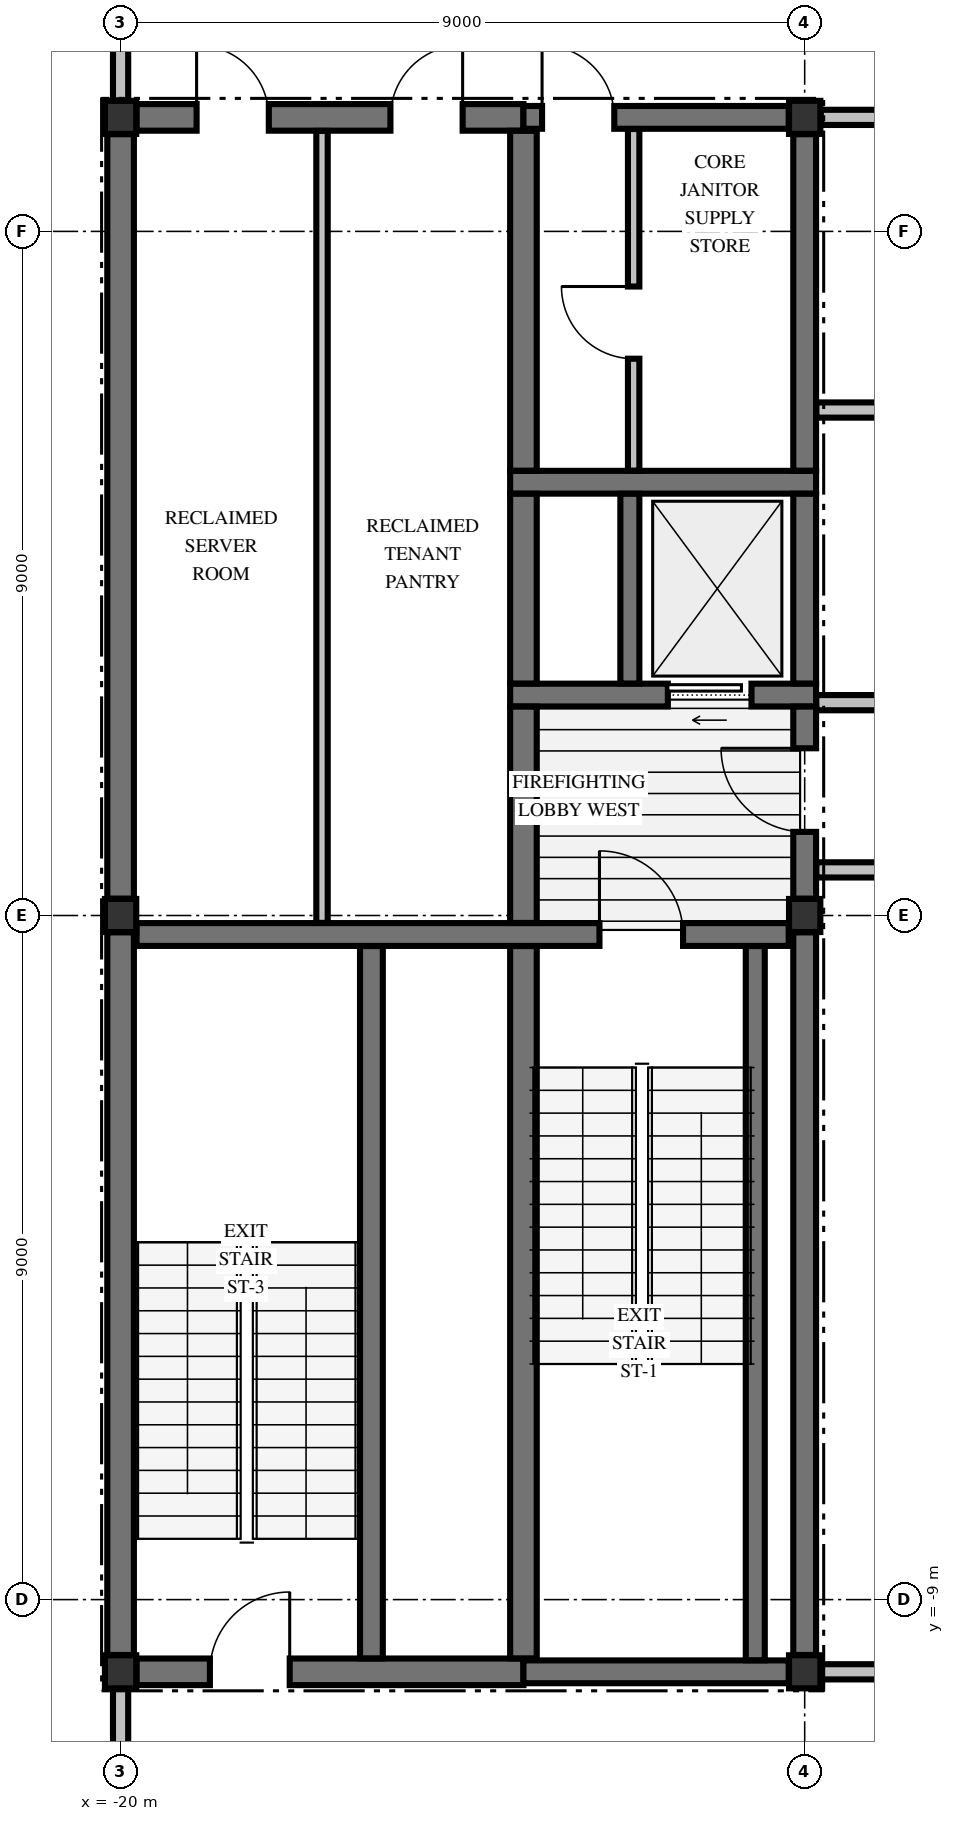
"""IFC4 building model, lengths in metres.
Left out: names, types, materials, properties, quantities, classifications, styles, units other than length and angle.
Written with IfcOpenShell. Run it as: python <this file> out.ifc"""

import sys

from ifc_helpers import new_model, si_unit, direction, frame, frame_2d, origin, origin_2d, place, context, subcontext, project, spatial, rectangle, i_section, extrude, element, fill, save


model = new_model("IFC4")
c1 = context("Model", 3, precision=1e-05, world=origin(), true_north=direction((0.0, 1.0)))
c2 = subcontext(c1, "Body", "Model", "MODEL_VIEW")
j1 = project(units=[si_unit("LENGTHUNIT", "METRE"), si_unit("PLANEANGLEUNIT", "RADIAN")], contexts=[c1])
p1 = place(None, origin())
s1 = spatial("IfcSite", under=j1, at=p1, CompositionType="ELEMENT")
p2 = place(p1, origin())
s2 = spatial("IfcBuilding", under=s1, at=p2, CompositionType="ELEMENT")
p3 = place(p2, frame((0.0, 0.0, 153.48)))
s3 = spatial("IfcBuildingStorey", under=s2, at=p3, CompositionType="ELEMENT", Elevation=153.48)
for number, where, z_axis, x_axis in (
    (1, (-20.0, -9.95, -0.425), (0.0, 0.0, 1.0), (1.0, 0.0, 0.0)),
    (2, (-20.0, 10.5, -0.425), (0.0, 0.0, 1.0), (1.0, 0.0, 0.0)),
    (3, (-11.0, -9.95, -0.425), (0.0, 0.0, 1.0), (1.0, 0.0, 0.0)),
    (4, (-11.0, 0.0, -0.425), (0.0, 0.0, 1.0), (1.0, 0.0, 0.0)),
    (5, (-11.0, 10.5, -0.425), (0.0, 0.0, 1.0), (1.0, 0.0, 0.0)),
    (6, (-20.0, 0.0, -0.425), (0.0, 0.0, 1.0), (1.0, 0.0, 0.0)),
):
    element("IfcColumn", number, at=place(p3, frame(where, z_axis=z_axis, x_axis=x_axis)), inside=s3, PredefinedType="COLUMN", context=c2, shape_type="SweptSolid", body=[
        extrude(i_section(OverallWidth=0.412, OverallDepth=0.435, WebThickness=0.036, FlangeThickness=0.058, FilletRadius=0.015, at=origin_2d()), origin(), (0.0, 0.0, 1.0), 4.76),
    ])
p4 = place(p3, frame((-19.79, -9.95, 0.0), z_axis=(0.0, 0.0, 1.0), x_axis=(1.0, 0.0, 0.0)))
e7 = element("IfcWall", 7, at=p4, inside=s3, PredefinedType="SHEAR", context=c2, shape_type="SweptSolid", body=[
    extrude(rectangle(XDim=5.09, YDim=0.35, at=frame_2d((2.545, 0.0))), origin(), (0.0, 0.0, 1.0), 4.335),
])
p5 = place(p4, frame((0.965, 0.0, 0.0)))
e8 = element("IfcOpeningElement", 8, at=p5, cuts=e7, PredefinedType="OPENING", context=c2, shape_type="SweptSolid", body=[
    extrude(rectangle(XDim=1.05, YDim=2.15, at=frame_2d((0.525, 1.075))), frame((0.0, 0.185, 0.0), z_axis=(0.0, -1.0, 0.0), x_axis=(1.0, 0.0, 0.0)), (0.0, 0.0, 1.0), 0.37),
])
p6 = place(p3, frame((-14.7, -9.95, 0.0), z_axis=(0.0, 0.0, 1.0), x_axis=(1.0, 0.0, 0.0)))
e9 = element("IfcWall", 9, at=p6, inside=s3, PredefinedType="SHEAR", context=c2, shape_type="SweptSolid", body=[
    extrude(rectangle(XDim=3.49, YDim=0.3, at=frame_2d((1.745, 0.0))), origin(), (0.0, 0.0, 1.0), 4.335),
])
p7 = place(p3, frame((-19.79, -0.25, 0.0), z_axis=(0.0, 0.0, 1.0), x_axis=(1.0, 0.0, 0.0)))
e10 = element("IfcWall", 10, at=p7, inside=s3, PredefinedType="SHEAR", context=c2, shape_type="SweptSolid", body=[
    extrude(rectangle(XDim=8.58, YDim=0.3, at=frame_2d((4.29, 0.0))), origin(), (0.0, 0.0, 1.0), 4.335),
])
p8 = place(p7, frame((6.09, 0.0, 0.0)))
e11 = element("IfcOpeningElement", 11, at=p8, cuts=e10, PredefinedType="OPENING", context=c2, shape_type="SweptSolid", body=[
    extrude(rectangle(XDim=1.1, YDim=2.15, at=frame_2d((0.55, 1.075))), frame((0.0, 0.16, 0.0), z_axis=(0.0, -1.0, 0.0), x_axis=(1.0, 0.0, 0.0)), (0.0, 0.0, 1.0), 0.32),
])
p9 = place(p3, frame((-14.875, 2.9, 0.0), z_axis=(0.0, 0.0, 1.0), x_axis=(1.0, 0.0, 0.0)))
e12 = element("IfcWall", 12, at=p9, inside=s3, PredefinedType="SHEAR", context=c2, shape_type="SweptSolid", body=[
    extrude(rectangle(XDim=4.025, YDim=0.3, at=frame_2d((2.012, 0.0))), origin(), (0.0, 0.0, 1.0), 4.335),
])
p10 = place(p9, frame((2.075, 0.0, 0.0)))
e13 = element("IfcOpeningElement", 13, at=p10, cuts=e12, PredefinedType="OPENING", context=c2, shape_type="SweptSolid", body=[
    extrude(rectangle(XDim=1.1, YDim=2.2, at=frame_2d((0.55, 1.1))), frame((0.0, 0.16, 0.0), z_axis=(0.0, -1.0, 0.0), x_axis=(1.0, 0.0, 0.0)), (0.0, 0.0, 1.0), 0.32),
])
p11 = place(p3, frame((-14.875, 5.7, 0.0), z_axis=(0.0, 0.0, 1.0), x_axis=(1.0, 0.0, 0.0)))
e14 = element("IfcWall", 14, at=p11, inside=s3, PredefinedType="SHEAR", context=c2, shape_type="SweptSolid", body=[
    extrude(rectangle(XDim=4.025, YDim=0.3, at=frame_2d((2.012, 0.0))), origin(), (0.0, 0.0, 1.0), 4.335),
])
p12 = place(p3, frame((-19.79, 10.5, 0.0), z_axis=(0.0, 0.0, 1.0), x_axis=(1.0, 0.0, 0.0)))
e15 = element("IfcWall", 15, at=p12, inside=s3, PredefinedType="SHEAR", context=c2, shape_type="SweptSolid", body=[
    extrude(rectangle(XDim=5.09, YDim=0.35, at=frame_2d((2.545, 0.0))), origin(), (0.0, 0.0, 1.0), 4.335),
])
p13 = place(p12, frame((0.79, 0.0, 0.0)))
e16 = element("IfcOpeningElement", 16, at=p13, cuts=e15, PredefinedType="OPENING", context=c2, shape_type="SweptSolid", body=[
    extrude(rectangle(XDim=0.95, YDim=2.02, at=frame_2d((0.475, 1.01))), frame((0.0, 0.185, 0.0), z_axis=(0.0, -1.0, 0.0), x_axis=(1.0, 0.0, 0.0)), (0.0, 0.0, 1.0), 0.37),
])
p14 = place(p12, frame((3.34, 0.0, 0.0)))
e17 = element("IfcOpeningElement", 17, at=p14, cuts=e15, PredefinedType="OPENING", context=c2, shape_type="SweptSolid", body=[
    extrude(rectangle(XDim=0.95, YDim=2.02, at=frame_2d((0.475, 1.01))), frame((0.0, 0.185, 0.0), z_axis=(0.0, -1.0, 0.0), x_axis=(1.0, 0.0, 0.0)), (0.0, 0.0, 1.0), 0.37),
])
p15 = place(p3, frame((-14.7, 10.5, 0.0), z_axis=(0.0, 0.0, 1.0), x_axis=(1.0, 0.0, 0.0)))
e18 = element("IfcWall", 18, at=p15, inside=s3, PredefinedType="SHEAR", context=c2, shape_type="SweptSolid", body=[
    extrude(rectangle(XDim=3.49, YDim=0.3, at=frame_2d((1.745, 0.0))), origin(), (0.0, 0.0, 1.0), 4.335),
])
p16 = place(p15, frame((0.245, 0.0, 0.0)))
e19 = element("IfcOpeningElement", 19, at=p16, cuts=e18, PredefinedType="OPENING", context=c2, shape_type="SweptSolid", body=[
    extrude(rectangle(XDim=0.95, YDim=2.02, at=frame_2d((0.475, 1.01))), frame((0.0, 0.16, 0.0), z_axis=(0.0, -1.0, 0.0), x_axis=(1.0, 0.0, 0.0)), (0.0, 0.0, 1.0), 0.32),
])
p17 = place(p3, frame((-10.788, -9.95, 0.0), z_axis=(0.0, 0.0, 1.0), x_axis=(1.0, 0.0, 0.0)))
e20 = element("IfcWall", 20, at=p17, inside=s3, PredefinedType="PARTITIONING", context=c2, shape_type="SweptSolid", body=[
    extrude(rectangle(XDim=21.576, YDim=0.2, at=frame_2d((10.788, 0.0))), origin(), (0.0, 0.0, 1.0), 4.335),
])
p18 = place(p17, frame((7.238, 0.0, 0.0)))
e21 = element("IfcOpeningElement", 21, at=p18, cuts=e20, PredefinedType="OPENING", context=c2, shape_type="SweptSolid", body=[
    extrude(rectangle(XDim=1.1, YDim=2.15, at=frame_2d((0.55, 1.075))), frame((0.0, 0.11, 0.0), z_axis=(0.0, -1.0, 0.0), x_axis=(1.0, 0.0, 0.0)), (0.0, 0.0, 1.0), 0.22),
])
p19 = place(p3, frame((-10.847, 0.6, 0.0), z_axis=(0.0, 0.0, 1.0), x_axis=(1.0, 0.0, 0.0)))
e22 = element("IfcWall", 22, at=p19, inside=s3, PredefinedType="PARTITIONING", context=c2, shape_type="SweptSolid", body=[
    extrude(rectangle(XDim=21.694, YDim=0.2, at=frame_2d((10.847, 0.0))), origin(), (0.0, 0.0, 1.0), 4.335),
])
p20 = place(p19, frame((7.297, 0.0, 0.0)))
e23 = element("IfcOpeningElement", 23, at=p20, cuts=e22, PredefinedType="OPENING", context=c2, shape_type="SweptSolid", body=[
    extrude(rectangle(XDim=1.1, YDim=2.15, at=frame_2d((0.55, 1.075))), frame((0.0, 0.11, 0.0), z_axis=(0.0, -1.0, 0.0), x_axis=(1.0, 0.0, 0.0)), (0.0, 0.0, 1.0), 0.22),
])
p21 = place(p19, frame((2.647, 0.0, 0.0)))
e24 = element("IfcOpeningElement", 24, at=p21, cuts=e22, PredefinedType="OPENING", context=c2, shape_type="SweptSolid", body=[
    extrude(rectangle(XDim=1.2, YDim=2.15, at=frame_2d((0.6, 1.075))), frame((0.0, 0.11, 0.0), z_axis=(0.0, -1.0, 0.0), x_axis=(1.0, 0.0, 0.0)), (0.0, 0.0, 1.0), 0.22),
])
p22 = place(p19, frame((14.847, 0.0, 0.0)))
e25 = element("IfcOpeningElement", 25, at=p22, cuts=e22, PredefinedType="OPENING", context=c2, shape_type="SweptSolid", body=[
    extrude(rectangle(XDim=1.2, YDim=2.15, at=frame_2d((0.6, 1.075))), frame((0.0, 0.11, 0.0), z_axis=(0.0, -1.0, 0.0), x_axis=(1.0, 0.0, 0.0)), (0.0, 0.0, 1.0), 0.22),
])
p23 = place(p3, frame((-10.847, 2.8, 0.0), z_axis=(0.0, 0.0, 1.0), x_axis=(1.0, 0.0, 0.0)))
e26 = element("IfcWall", 26, at=p23, inside=s3, PredefinedType="PARTITIONING", context=c2, shape_type="SweptSolid", body=[
    extrude(rectangle(XDim=21.694, YDim=0.2, at=frame_2d((10.847, 0.0))), origin(), (0.0, 0.0, 1.0), 4.335),
])
p24 = place(p23, frame((7.297, 0.0, 0.0)))
e27 = element("IfcOpeningElement", 27, at=p24, cuts=e26, PredefinedType="OPENING", context=c2, shape_type="SweptSolid", body=[
    extrude(rectangle(XDim=1.1, YDim=2.15, at=frame_2d((0.55, 1.075))), frame((0.0, 0.11, 0.0), z_axis=(0.0, -1.0, 0.0), x_axis=(1.0, 0.0, 0.0)), (0.0, 0.0, 1.0), 0.22),
])
p25 = place(p23, frame((17.497, 0.0, 0.0)))
e28 = element("IfcOpeningElement", 28, at=p25, cuts=e26, PredefinedType="OPENING", context=c2, shape_type="SweptSolid", body=[
    extrude(rectangle(XDim=1.1, YDim=2.15, at=frame_2d((0.55, 1.075))), frame((0.0, 0.11, 0.0), z_axis=(0.0, -1.0, 0.0), x_axis=(1.0, 0.0, 0.0)), (0.0, 0.0, 1.0), 0.22),
])
p26 = place(p3, frame((-10.847, 6.65, 0.0), z_axis=(0.0, 0.0, 1.0), x_axis=(1.0, 0.0, 0.0)))
e29 = element("IfcWall", 29, at=p26, inside=s3, PredefinedType="PARTITIONING", context=c2, shape_type="SweptSolid", body=[
    extrude(rectangle(XDim=6.747, YDim=0.2, at=frame_2d((3.374, 0.0))), origin(), (0.0, 0.0, 1.0), 4.335),
])
p27 = place(p3, frame((-10.788, 10.5, 0.0), z_axis=(0.0, 0.0, 1.0), x_axis=(1.0, 0.0, 0.0)))
e30 = element("IfcWall", 30, at=p27, inside=s3, PredefinedType="PARTITIONING", context=c2, shape_type="SweptSolid", body=[
    extrude(rectangle(XDim=21.576, YDim=0.2, at=frame_2d((10.788, 0.0))), origin(), (0.0, 0.0, 1.0), 4.335),
])
p28 = place(p27, frame((7.238, 0.0, 0.0)))
e31 = element("IfcOpeningElement", 31, at=p28, cuts=e30, PredefinedType="OPENING", context=c2, shape_type="SweptSolid", body=[
    extrude(rectangle(XDim=1.1, YDim=2.15, at=frame_2d((0.55, 1.075))), frame((0.0, 0.11, 0.0), z_axis=(0.0, -1.0, 0.0), x_axis=(1.0, 0.0, 0.0)), (0.0, 0.0, 1.0), 0.22),
])
p29 = place(p3, frame((-20.0, -9.729, 0.0), z_axis=(0.0, 0.0, 1.0), x_axis=(0.0, 1.0, 0.0)))
e32 = element("IfcWall", 32, at=p29, inside=s3, PredefinedType="SHEAR", context=c2, shape_type="SweptSolid", body=[
    extrude(rectangle(XDim=9.507, YDim=0.35, at=frame_2d((4.753, 0.0))), origin(), (0.0, 0.0, 1.0), 4.335),
])
p30 = place(p3, frame((-20.0, 0.221, 0.0), z_axis=(0.0, 0.0, 1.0), x_axis=(0.0, 1.0, 0.0)))
e33 = element("IfcWall", 33, at=p30, inside=s3, PredefinedType="SHEAR", context=c2, shape_type="SweptSolid", body=[
    extrude(rectangle(XDim=10.057, YDim=0.35, at=frame_2d((5.029, 0.0))), origin(), (0.0, 0.0, 1.0), 4.335),
])
p31 = place(p3, frame((-16.7, -9.773, 0.0), z_axis=(0.0, 0.0, 1.0), x_axis=(0.0, 1.0, 0.0)))
e34 = element("IfcWall", 34, at=p31, inside=s3, PredefinedType="SHEAR", context=c2, shape_type="SweptSolid", body=[
    extrude(rectangle(XDim=9.371, YDim=0.3, at=frame_2d((4.686, 0.0))), origin(), (0.0, 0.0, 1.0), 4.335),
])
p32 = place(p3, frame((-14.7, -9.773, 0.0), z_axis=(0.0, 0.0, 1.0), x_axis=(0.0, 1.0, 0.0)))
e35 = element("IfcWall", 35, at=p32, inside=s3, PredefinedType="SHEAR", context=c2, shape_type="SweptSolid", body=[
    extrude(rectangle(XDim=9.371, YDim=0.35, at=frame_2d((4.686, 0.0))), origin(), (0.0, 0.0, 1.0), 4.335),
])
p33 = place(p3, frame((-14.7, -0.098, 0.0), z_axis=(0.0, 0.0, 1.0), x_axis=(0.0, 1.0, 0.0)))
e36 = element("IfcWall", 36, at=p33, inside=s3, PredefinedType="SHEAR", context=c2, shape_type="SweptSolid", body=[
    extrude(rectangle(XDim=2.846, YDim=0.35, at=frame_2d((1.423, 0.0))), origin(), (0.0, 0.0, 1.0), 4.335),
])
p34 = place(p3, frame((-14.7, 3.052, 0.0), z_axis=(0.0, 0.0, 1.0), x_axis=(0.0, 1.0, 0.0)))
e37 = element("IfcWall", 37, at=p34, inside=s3, PredefinedType="SHEAR", context=c2, shape_type="SweptSolid", body=[
    extrude(rectangle(XDim=2.496, YDim=0.35, at=frame_2d((1.248, 0.0))), origin(), (0.0, 0.0, 1.0), 4.335),
])
p35 = place(p3, frame((-14.7, 5.852, 0.0), z_axis=(0.0, 0.0, 1.0), x_axis=(0.0, 1.0, 0.0)))
e38 = element("IfcWall", 38, at=p35, inside=s3, PredefinedType="SHEAR", context=c2, shape_type="SweptSolid", body=[
    extrude(rectangle(XDim=4.471, YDim=0.35, at=frame_2d((2.235, 0.0))), origin(), (0.0, 0.0, 1.0), 4.335),
])
p36 = place(p3, frame((-13.3, 3.052, 0.0), z_axis=(0.0, 0.0, 1.0), x_axis=(0.0, 1.0, 0.0)))
e39 = element("IfcWall", 39, at=p36, inside=s3, PredefinedType="SOLIDWALL", context=c2, shape_type="SweptSolid", body=[
    extrude(rectangle(XDim=2.496, YDim=0.25, at=frame_2d((1.248, 0.0))), origin(), (0.0, 0.0, 1.0), 4.335),
])
p37 = place(p3, frame((-11.65, -9.798, 0.0), z_axis=(0.0, 0.0, 1.0), x_axis=(0.0, 1.0, 0.0)))
e40 = element("IfcWall", 40, at=p37, inside=s3, PredefinedType="SOLIDWALL", context=c2, shape_type="SweptSolid", body=[
    extrude(rectangle(XDim=9.396, YDim=0.25, at=frame_2d((4.698, 0.0))), origin(), (0.0, 0.0, 1.0), 4.335),
])
p38 = place(p3, frame((-11.0, -9.729, 0.0), z_axis=(0.0, 0.0, 1.0), x_axis=(0.0, 1.0, 0.0)))
e41 = element("IfcWall", 41, at=p38, inside=s3, PredefinedType="SHEAR", context=c2, shape_type="SweptSolid", body=[
    extrude(rectangle(XDim=9.507, YDim=0.3, at=frame_2d((4.753, 0.0))), origin(), (0.0, 0.0, 1.0), 4.335),
])
p39 = place(p3, frame((-11.0, 0.221, 0.0), z_axis=(0.0, 0.0, 1.0), x_axis=(0.0, 1.0, 0.0)))
e42 = element("IfcWall", 42, at=p39, inside=s3, PredefinedType="SHEAR", context=c2, shape_type="SweptSolid", body=[
    extrude(rectangle(XDim=2.527, YDim=0.3, at=frame_2d((1.263, 0.0))), origin(), (0.0, 0.0, 1.0), 4.335),
])
p40 = place(p39, frame((0.878, 0.0, 0.0)))
e43 = element("IfcOpeningElement", 43, at=p40, cuts=e42, PredefinedType="OPENING", context=c2, shape_type="SweptSolid", body=[
    extrude(rectangle(XDim=1.1, YDim=2.15, at=frame_2d((0.55, 1.075))), frame((0.0, 0.16, 0.0), z_axis=(0.0, -1.0, 0.0), x_axis=(1.0, 0.0, 0.0)), (0.0, 0.0, 1.0), 0.32),
])
p41 = place(p3, frame((-11.0, 3.052, 0.0), z_axis=(0.0, 0.0, 1.0), x_axis=(0.0, 1.0, 0.0)))
e44 = element("IfcWall", 44, at=p41, inside=s3, PredefinedType="SHEAR", context=c2, shape_type="SweptSolid", body=[
    extrude(rectangle(XDim=2.496, YDim=0.3, at=frame_2d((1.248, 0.0))), origin(), (0.0, 0.0, 1.0), 4.335),
])
p42 = place(p3, frame((-11.0, 5.852, 0.0), z_axis=(0.0, 0.0, 1.0), x_axis=(0.0, 1.0, 0.0)))
e45 = element("IfcWall", 45, at=p42, inside=s3, PredefinedType="SHEAR", context=c2, shape_type="SweptSolid", body=[
    extrude(rectangle(XDim=4.427, YDim=0.3, at=frame_2d((2.213, 0.0))), origin(), (0.0, 0.0, 1.0), 4.335),
])
p43 = place(p3, frame((-20.0, -12.697, 0.0), z_axis=(0.0, 0.0, 1.0), x_axis=(0.0, 1.0, 0.0)))
e46 = element("IfcWall", 46, at=p43, inside=s3, PredefinedType="PARTITIONING", context=c2, shape_type="SweptSolid", body=[
    extrude(rectangle(XDim=2.523, YDim=0.2, at=frame_2d((1.262, 0.0))), origin(), (0.0, 0.0, 1.0), 1.927),
])
p44 = place(p3, frame((-20.0, 10.723, 0.0), z_axis=(0.0, 0.0, 1.0), x_axis=(0.0, 1.0, 0.0)))
e47 = element("IfcWall", 47, at=p44, inside=s3, PredefinedType="PARTITIONING", context=c2, shape_type="SweptSolid", body=[
    extrude(rectangle(XDim=1.974, YDim=0.2, at=frame_2d((0.987, 0.0))), origin(), (0.0, 0.0, 1.0), 2.127),
])
p45 = place(p3, frame((-17.35, -0.097, 0.0), z_axis=(0.0, 0.0, 1.0), x_axis=(0.0, 1.0, 0.0)))
e48 = element("IfcWall", 48, at=p45, inside=s3, PredefinedType="PARTITIONING", context=c2, shape_type="SweptSolid", body=[
    extrude(rectangle(XDim=10.419, YDim=0.15, at=frame_2d((5.209, 0.0))), origin(), (0.0, 0.0, 1.0), 4.335),
])
p46 = place(p3, frame((-13.25, 5.853, 0.0), z_axis=(0.0, 0.0, 1.0), x_axis=(0.0, 1.0, 0.0)))
e49 = element("IfcWall", 49, at=p46, inside=s3, PredefinedType="PARTITIONING", context=c2, shape_type="SweptSolid", body=[
    extrude(rectangle(XDim=4.494, YDim=0.15, at=frame_2d((2.247, 0.0))), origin(), (0.0, 0.0, 1.0), 4.335),
])
p47 = place(p46, frame((1.472, 0.0, 0.0)))
e50 = element("IfcOpeningElement", 50, at=p47, cuts=e49, PredefinedType="OPENING", context=c2, shape_type="SweptSolid", body=[
    extrude(rectangle(XDim=0.95, YDim=2.15, at=frame_2d((0.475, 1.075))), frame((0.0, 0.085, 0.0), z_axis=(0.0, -1.0, 0.0), x_axis=(1.0, 0.0, 0.0)), (0.0, 0.0, 1.0), 0.17),
])
p48 = place(p8, origin())
e51 = element("IfcDoor", 51, at=p48, inside=s3, OperationType="SINGLE_SWING_LEFT", PredefinedType="DOOR", context=c2, shape_type="SweptSolid", body=[
    extrude(rectangle(XDim=1.1, YDim=2.15, at=frame_2d((0.55, 1.075))), frame((0.0, 0.025, 0.0), z_axis=(0.0, -1.0, 0.0), x_axis=(1.0, 0.0, 0.0)), (0.0, 0.0, 1.0), 0.05),
])
fill(e11, e51)
p49 = place(p40, origin())
e52 = element("IfcDoor", 52, at=p49, inside=s3, OperationType="SINGLE_SWING_RIGHT", PredefinedType="DOOR", context=c2, shape_type="SweptSolid", body=[
    extrude(rectangle(XDim=1.1, YDim=2.15, at=frame_2d((0.55, 1.075))), frame((0.0, 0.025, 0.0), z_axis=(0.0, -1.0, 0.0), x_axis=(1.0, 0.0, 0.0)), (0.0, 0.0, 1.0), 0.05),
])
fill(e43, e52)
p50 = place(p10, origin())
e53 = element("IfcDoor", 53, at=p50, inside=s3, OperationType="SLIDING_TO_LEFT", PredefinedType="DOOR", context=c2, shape_type="SweptSolid", body=[
    extrude(rectangle(XDim=1.1, YDim=2.2, at=frame_2d((0.55, 1.1))), frame((0.0, 0.025, 0.0), z_axis=(0.0, -1.0, 0.0), x_axis=(1.0, 0.0, 0.0)), (0.0, 0.0, 1.0), 0.05),
])
fill(e13, e53)
p51 = place(p16, origin())
e54 = element("IfcDoor", 54, at=p51, inside=s3, OperationType="SINGLE_SWING_LEFT", PredefinedType="DOOR", context=c2, shape_type="SweptSolid", body=[
    extrude(rectangle(XDim=0.95, YDim=2.02, at=frame_2d((0.475, 1.01))), frame((0.0, 0.025, 0.0), z_axis=(0.0, -1.0, 0.0), x_axis=(1.0, 0.0, 0.0)), (0.0, 0.0, 1.0), 0.05),
])
fill(e19, e54)
p52 = place(p47, origin())
e55 = element("IfcDoor", 55, at=p52, inside=s3, OperationType="SINGLE_SWING_RIGHT", PredefinedType="DOOR", context=c2, shape_type="SweptSolid", body=[
    extrude(rectangle(XDim=0.95, YDim=2.15, at=frame_2d((0.475, 1.075))), frame((0.0, 0.025, 0.0), z_axis=(0.0, -1.0, 0.0), x_axis=(1.0, 0.0, 0.0)), (0.0, 0.0, 1.0), 0.05),
])
fill(e50, e55)
p53 = place(p5, origin())
e56 = element("IfcDoor", 56, at=p53, inside=s3, OperationType="SINGLE_SWING_RIGHT", PredefinedType="DOOR", context=c2, shape_type="SweptSolid", body=[
    extrude(rectangle(XDim=1.05, YDim=2.15, at=frame_2d((0.525, 1.075))), frame((0.0, 0.025, 0.0), z_axis=(0.0, -1.0, 0.0), x_axis=(1.0, 0.0, 0.0)), (0.0, 0.0, 1.0), 0.05),
])
fill(e8, e56)
p54 = place(p13, origin())
e57 = element("IfcDoor", 57, at=p54, inside=s3, OperationType="SINGLE_SWING_LEFT", PredefinedType="DOOR", context=c2, shape_type="SweptSolid", body=[
    extrude(rectangle(XDim=0.95, YDim=2.02, at=frame_2d((0.475, 1.01))), frame((0.0, 0.025, 0.0), z_axis=(0.0, -1.0, 0.0), x_axis=(1.0, 0.0, 0.0)), (0.0, 0.0, 1.0), 0.05),
])
fill(e16, e57)
p55 = place(p14, origin())
e58 = element("IfcDoor", 58, at=p55, inside=s3, OperationType="SINGLE_SWING_RIGHT", PredefinedType="DOOR", context=c2, shape_type="SweptSolid", body=[
    extrude(rectangle(XDim=0.95, YDim=2.02, at=frame_2d((0.475, 1.01))), frame((0.0, 0.025, 0.0), z_axis=(0.0, -1.0, 0.0), x_axis=(1.0, 0.0, 0.0)), (0.0, 0.0, 1.0), 0.05),
])
fill(e17, e58)
save(model, sys.argv[1])
